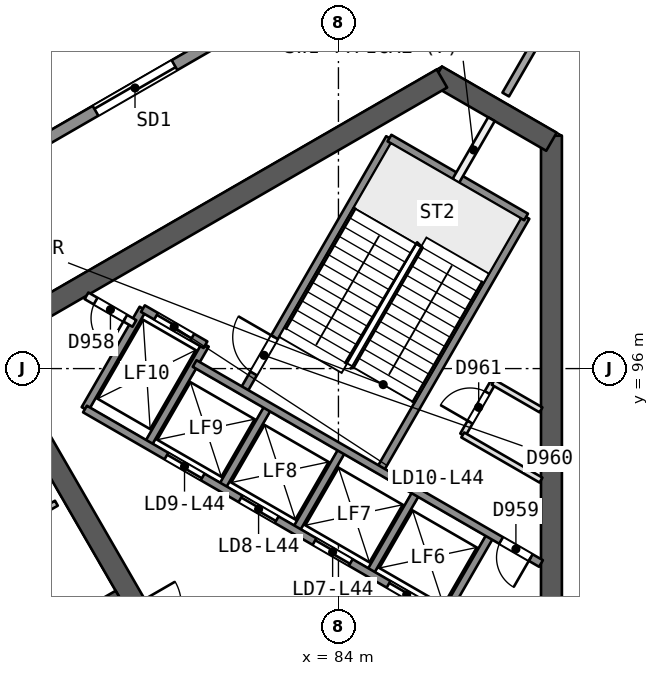
"""IFC4 building model, lengths in metres.
Left out: names, types, materials, properties, quantities, classifications, styles, units other than length and angle.
Written with IfcOpenShell. Run it as: python <this file> out.ifc"""

import sys

from ifc_helpers import new_model, si_unit, direction, frame, frame_2d, origin, place, context, subcontext, project, spatial, rectangle, extrude, element, fill, save


model = new_model("IFC4")
c1 = context("Model", 3, precision=1e-05, world=origin(), true_north=direction((0.0, 1.0)))
c2 = subcontext(c1, "Body", "Model", "MODEL_VIEW")
j1 = project(units=[si_unit("LENGTHUNIT", "METRE"), si_unit("PLANEANGLEUNIT", "RADIAN")], contexts=[c1])
p1 = place(None, origin())
s1 = spatial("IfcSite", under=j1, at=p1, CompositionType="ELEMENT")
p2 = place(p1, origin())
s2 = spatial("IfcBuilding", under=s1, at=p2, CompositionType="ELEMENT")
p3 = place(p2, frame((0.0, 0.0, 182.2)))
s3 = spatial("IfcBuildingStorey", under=s2, at=p3, CompositionType="ELEMENT", Elevation=182.2)
p4 = place(p3, frame((89.605, 88.069, 0.0), z_axis=(0.0, 0.0, 1.0), x_axis=(0.0, 1.0, 0.0)))
e1 = element("IfcWall", 1, at=p4, inside=s3, PredefinedType="SHEAR", context=c2, shape_type="SweptSolid", body=[
    extrude(rectangle(XDim=14.058, YDim=0.55, at=frame_2d((7.029, 0.0))), origin(), (0.0, 0.0, 1.0), 3.7),
])
p5 = place(p3, frame((89.605, 101.969, 0.0), z_axis=(0.0, 0.0, 1.0), x_axis=(-0.865997833373, 0.500047750313, 0.0)))
e2 = element("IfcWall", 2, at=p5, inside=s3, PredefinedType="SHEAR", context=c2, shape_type="SweptSolid", body=[
    extrude(rectangle(XDim=3.487, YDim=0.55, at=frame_2d((1.743, 0.0))), origin(), (0.0, 0.0, 1.0), 3.7),
])
p6 = place(p3, frame((86.723, 103.633, 0.0), z_axis=(0.0, 0.0, 1.0), x_axis=(-0.866023530946, -0.500003243837, 0.0)))
e3 = element("IfcWall", 3, at=p6, inside=s3, PredefinedType="SHEAR", context=c2, shape_type="SweptSolid", body=[
    extrude(rectangle(XDim=14.175, YDim=0.55, at=frame_2d((7.087, 0.0))), origin(), (0.0, 0.0, 1.0), 3.7),
])
p7 = place(p3, frame((74.686, 96.683, 0.0), z_axis=(0.0, 0.0, 1.0), x_axis=(0.499997818338, -0.866026663364, 0.0)))
e4 = element("IfcWall", 4, at=p7, inside=s3, PredefinedType="SHEAR", context=c2, shape_type="SweptSolid", body=[
    extrude(rectangle(XDim=10.105, YDim=0.55, at=frame_2d((5.052, 0.0))), origin(), (0.0, 0.0, 1.0), 3.7),
])
p8 = place(p7, frame((7.955, 0.0, 0.0)))
e5 = element("IfcOpeningElement", 5, at=p8, cuts=e4, PredefinedType="OPENING", context=c2, shape_type="SweptSolid", body=[
    extrude(rectangle(XDim=1.2, YDim=2.1, at=frame_2d((0.6, 1.05))), frame((0.0, 0.286, 0.0), z_axis=(0.0, -1.0, 0.0), x_axis=(1.0, 0.0, 0.0)), (0.0, 0.0, 1.0), 0.571),
])
p9 = place(p3, frame((78.2, 90.046, 0.0), z_axis=(0.0, 0.0, 1.0), x_axis=(-0.866026492143, -0.499998114903, 0.0)))
e6 = element("IfcWall", 6, at=p9, inside=s3, PredefinedType="SHEAR", context=c2, shape_type="SweptSolid", body=[
    extrude(rectangle(XDim=15.588, YDim=0.25, at=frame_2d((7.794, 0.0))), origin(), (0.0, 0.0, 1.0), 3.25),
])
p10 = place(p9, frame((3.138, 0.0, 0.0)))
e7 = element("IfcOpeningElement", 7, at=p10, cuts=e6, PredefinedType="OPENING", context=c2, shape_type="SweptSolid", body=[
    extrude(rectangle(XDim=1.0, YDim=2.1, at=frame_2d((0.5, 1.05))), frame((0.0, 0.135, 0.0), z_axis=(0.0, -1.0, 0.0), x_axis=(1.0, 0.0, 0.0)), (0.0, 0.0, 1.0), 0.271),
])
p11 = place(p9, frame((6.415, 0.0, 0.0)))
e8 = element("IfcOpeningElement", 8, at=p11, cuts=e6, PredefinedType="OPENING", context=c2, shape_type="SweptSolid", body=[
    extrude(rectangle(XDim=1.2, YDim=2.4, at=frame_2d((0.6, 1.2))), frame((0.0, 0.135, 0.0), z_axis=(0.0, -1.0, 0.0), x_axis=(1.0, 0.0, 0.0)), (0.0, 0.0, 1.0), 0.271),
])
p12 = place(p9, frame((11.971, 0.0, 0.0)))
e9 = element("IfcOpeningElement", 9, at=p12, cuts=e6, PredefinedType="OPENING", context=c2, shape_type="SweptSolid", body=[
    extrude(rectangle(XDim=1.0, YDim=2.1, at=frame_2d((0.5, 1.05))), frame((0.0, 0.135, 0.0), z_axis=(0.0, -1.0, 0.0), x_axis=(1.0, 0.0, 0.0)), (0.0, 0.0, 1.0), 0.271),
])
p13 = place(p3, frame((91.006, 107.721, 0.0), z_axis=(0.0, 0.0, 1.0), x_axis=(-0.500015953014, -0.866016193112, 0.0)))
e10 = element("IfcWall", 10, at=p13, inside=s3, PredefinedType="PARTITIONING", context=c2, shape_type="SweptSolid", body=[
    extrude(rectangle(XDim=5.208, YDim=0.2, at=frame_2d((2.604, 0.0))), origin(), (0.0, 0.0, 1.0), 3.25),
])
p14 = place(p3, frame((74.498, 91.257, 0.0), z_axis=(0.0, 0.0, 1.0), x_axis=(0.866038271014, 0.499977712642, 0.0)))
e11 = element("IfcWall", 11, at=p14, inside=s3, PredefinedType="PARTITIONING", context=c2, shape_type="SweptSolid", body=[
    extrude(rectangle(XDim=2.401, YDim=0.15, at=frame_2d((1.2, 0.0))), origin(), (0.0, 0.0, 1.0), 3.25),
])
p15 = place(p3, frame((42.841, 82.711, 0.0), z_axis=(0.0, 0.0, 1.0), x_axis=(0.866024774967, 0.500001089142, 0.0)))
e12 = element("IfcWall", 12, at=p15, inside=s3, PredefinedType="SOLIDWALL", context=c2, shape_type="SweptSolid", body=[
    extrude(rectangle(XDim=52.991, YDim=0.3, at=frame_2d((26.496, 0.0))), origin(), (0.0, 0.0, 1.0), 3.25),
])
p16 = place(p15, frame((20.619, 0.0, 0.0)))
e13 = element("IfcOpeningElement", 13, at=p16, cuts=e12, PredefinedType="OPENING", context=c2, shape_type="SweptSolid", body=[
    extrude(rectangle(XDim=2.4, YDim=2.4, at=frame_2d((1.2, 1.2))), frame((0.0, 0.161, 0.0), z_axis=(0.0, -1.0, 0.0), x_axis=(1.0, 0.0, 0.0)), (0.0, 0.0, 1.0), 0.321),
])
p17 = place(p15, frame((9.392, 0.0, 0.0)))
e14 = element("IfcOpeningElement", 14, at=p17, cuts=e12, PredefinedType="OPENING", context=c2, shape_type="SweptSolid", body=[
    extrude(rectangle(XDim=2.4, YDim=2.4, at=frame_2d((1.2, 1.2))), frame((0.0, 0.161, 0.0), z_axis=(0.0, -1.0, 0.0), x_axis=(1.0, 0.0, 0.0)), (0.0, 0.0, 1.0), 0.321),
])
p18 = place(p15, frame((40.145, 0.0, 0.0)))
e15 = element("IfcOpeningElement", 15, at=p18, cuts=e12, PredefinedType="OPENING", context=c2, shape_type="SweptSolid", body=[
    extrude(rectangle(XDim=2.4, YDim=2.4, at=frame_2d((1.2, 1.2))), frame((0.0, 0.161, 0.0), z_axis=(0.0, -1.0, 0.0), x_axis=(1.0, 0.0, 0.0)), (0.0, 0.0, 1.0), 0.321),
])
p19 = place(p15, frame((26.375, 0.0, 0.9)))
e16 = element("IfcOpeningElement", 16, at=p19, cuts=e12, PredefinedType="OPENING", context=c2, shape_type="SweptSolid", body=[
    extrude(rectangle(XDim=1.8, YDim=1.5, at=frame_2d((0.9, 0.75))), frame((0.0, 0.161, 0.0), z_axis=(0.0, -1.0, 0.0), x_axis=(1.0, 0.0, 0.0)), (0.0, 0.0, 1.0), 0.321),
])
p20 = place(p3, frame((86.77, 89.486, 0.0), z_axis=(0.0, 0.0, 1.0), x_axis=(0.499961042966, 0.86604789447, 0.0)))
e17 = element("IfcWall", 17, at=p20, inside=s3, PredefinedType="SOLIDWALL", context=c2, shape_type="SweptSolid", body=[
    extrude(rectangle(XDim=2.48, YDim=0.2, at=frame_2d((1.24, 0.0))), origin(), (0.0, 0.0, 1.0), 3.25),
])
p21 = place(p3, frame((87.271, 94.254, 0.0), z_axis=(0.0, 0.0, 1.0), x_axis=(0.499995408039, 0.866028054938, 0.0)))
e18 = element("IfcWall", 18, at=p21, inside=s3, PredefinedType="PARTITIONING", context=c2, shape_type="SweptSolid", body=[
    extrude(rectangle(XDim=1.6, YDim=0.15, at=frame_2d((0.8, 0.0))), origin(), (0.0, 0.0, 1.0), 3.25),
])
p22 = place(p21, frame((0.387, 0.0, 0.0)))
e19 = element("IfcOpeningElement", 19, at=p22, cuts=e18, PredefinedType="OPENING", context=c2, shape_type="SweptSolid", body=[
    extrude(rectangle(XDim=0.9, YDim=2.1, at=frame_2d((0.45, 1.05))), frame((0.0, 0.085, 0.0), z_axis=(0.0, -1.0, 0.0), x_axis=(1.0, 0.0, 0.0)), (0.0, 0.0, 1.0), 0.171),
])
p23 = place(p3, frame((84.821, 90.611, 0.0), z_axis=(0.0, 0.0, 1.0), x_axis=(0.499961042966, 0.86604789447, 0.0)))
e20 = element("IfcWall", 20, at=p23, inside=s3, PredefinedType="SOLIDWALL", context=c2, shape_type="SweptSolid", body=[
    extrude(rectangle(XDim=2.48, YDim=0.2, at=frame_2d((1.24, 0.0))), origin(), (0.0, 0.0, 1.0), 3.25),
])
p24 = place(p3, frame((85.087, 93.321, 0.0), z_axis=(0.0, 0.0, 1.0), x_axis=(0.500019787375, 0.866013979237, 0.0)))
e21 = element("IfcWall", 21, at=p24, inside=s3, PredefinedType="SOLIDWALL", context=c2, shape_type="SweptSolid", body=[
    extrude(rectangle(XDim=7.7, YDim=0.2, at=frame_2d((3.85, 0.0))), origin(), (0.0, 0.0, 1.0), 3.25),
])
p25 = place(p3, frame((82.873, 91.736, 0.0), z_axis=(0.0, 0.0, 1.0), x_axis=(0.499961042966, 0.86604789447, 0.0)))
e22 = element("IfcWall", 22, at=p25, inside=s3, PredefinedType="SOLIDWALL", context=c2, shape_type="SweptSolid", body=[
    extrude(rectangle(XDim=2.48, YDim=0.2, at=frame_2d((1.24, 0.0))), origin(), (0.0, 0.0, 1.0), 3.25),
])
p26 = place(p3, frame((87.09, 100.94, 0.0), z_axis=(0.0, 0.0, 1.0), x_axis=(0.499951854219, 0.86605319898, 0.0)))
e23 = element("IfcWall", 23, at=p26, inside=s3, PredefinedType="PARTITIONING", context=c2, shape_type="SweptSolid", body=[
    extrude(rectangle(XDim=1.873, YDim=0.2, at=frame_2d((0.937, 0.0))), origin(), (0.0, 0.0, 1.0), 3.25),
])
p27 = place(p3, frame((80.924, 92.861, 0.0), z_axis=(0.0, 0.0, 1.0), x_axis=(0.499961042966, 0.86604789447, 0.0)))
e24 = element("IfcWall", 24, at=p27, inside=s3, PredefinedType="SOLIDWALL", context=c2, shape_type="SweptSolid", body=[
    extrude(rectangle(XDim=2.48, YDim=0.2, at=frame_2d((1.24, 0.0))), origin(), (0.0, 0.0, 1.0), 3.25),
])
p28 = place(p3, frame((81.493, 95.396, 0.0), z_axis=(0.0, 0.0, 1.0), x_axis=(0.500006057782, 0.866021906294, 0.0)))
e25 = element("IfcWall", 25, at=p28, inside=s3, PredefinedType="SOLIDWALL", context=c2, shape_type="SweptSolid", body=[
    extrude(rectangle(XDim=7.7, YDim=0.2, at=frame_2d((3.85, 0.0))), origin(), (0.0, 0.0, 1.0), 3.25),
])
p29 = place(p28, frame((0.55, 0.0, 0.0)))
e26 = element("IfcOpeningElement", 26, at=p29, cuts=e25, PredefinedType="OPENING", context=c2, shape_type="SweptSolid", body=[
    extrude(rectangle(XDim=1.1, YDim=2.1, at=frame_2d((0.55, 1.05))), frame((0.0, 0.11, 0.0), z_axis=(0.0, -1.0, 0.0), x_axis=(1.0, 0.0, 0.0)), (0.0, 0.0, 1.0), 0.221),
])
for number, where, z_axis, x_axis in (
    (27, (78.976, 93.986, 0.0), (0.0, 0.0, 1.0), (0.5, 0.866, 0.0)),
    (28, (77.33, 94.936, 0.0), (0.0, 0.0, 1.0), (0.5, 0.866, 0.0)),
):
    element("IfcWall", number, at=place(p3, frame(where, z_axis=z_axis, x_axis=x_axis)), inside=s3, PredefinedType="SOLIDWALL", context=c2, shape_type="SweptSolid", body=[
        extrude(rectangle(XDim=3.05, YDim=0.2, at=frame_2d((1.525, 0.0))), origin(), (0.0, 0.0, 1.0), 3.25),
    ])
p30 = place(p3, frame((86.77, 89.486, 0.0), z_axis=(0.0, 0.0, 1.0), x_axis=(-0.86601811187, 0.500012629753, 0.0)))
e29 = element("IfcWall", 29, at=p30, inside=s3, PredefinedType="SOLIDWALL", context=c2, shape_type="SweptSolid", body=[
    extrude(rectangle(XDim=10.9, YDim=0.2, at=frame_2d((5.45, 0.0))), origin(), (0.0, 0.0, 1.0), 3.25),
])
p31 = place(p30, frame((0.575, 0.0, 0.0)))
e30 = element("IfcOpeningElement", 30, at=p31, cuts=e29, PredefinedType="OPENING", context=c2, shape_type="SweptSolid", body=[
    extrude(rectangle(XDim=1.1, YDim=2.1, at=frame_2d((0.55, 1.05))), frame((0.0, 0.11, 0.0), z_axis=(0.0, -1.0, 0.0), x_axis=(1.0, 0.0, 0.0)), (0.0, 0.0, 1.0), 0.221),
])
p32 = place(p30, frame((2.825, 0.0, 0.0)))
e31 = element("IfcOpeningElement", 31, at=p32, cuts=e29, PredefinedType="OPENING", context=c2, shape_type="SweptSolid", body=[
    extrude(rectangle(XDim=1.1, YDim=2.1, at=frame_2d((0.55, 1.05))), frame((0.0, 0.11, 0.0), z_axis=(0.0, -1.0, 0.0), x_axis=(1.0, 0.0, 0.0)), (0.0, 0.0, 1.0), 0.221),
])
p33 = place(p30, frame((5.075, 0.0, 0.0)))
e32 = element("IfcOpeningElement", 32, at=p33, cuts=e29, PredefinedType="OPENING", context=c2, shape_type="SweptSolid", body=[
    extrude(rectangle(XDim=1.1, YDim=2.1, at=frame_2d((0.55, 1.05))), frame((0.0, 0.11, 0.0), z_axis=(0.0, -1.0, 0.0), x_axis=(1.0, 0.0, 0.0)), (0.0, 0.0, 1.0), 0.221),
])
p34 = place(p30, frame((7.325, 0.0, 0.0)))
e33 = element("IfcOpeningElement", 33, at=p34, cuts=e29, PredefinedType="OPENING", context=c2, shape_type="SweptSolid", body=[
    extrude(rectangle(XDim=1.1, YDim=2.1, at=frame_2d((0.55, 1.05))), frame((0.0, 0.11, 0.0), z_axis=(0.0, -1.0, 0.0), x_axis=(1.0, 0.0, 0.0)), (0.0, 0.0, 1.0), 0.221),
])
p35 = place(p3, frame((89.33, 90.872, 0.0), z_axis=(0.0, 0.0, 1.0), x_axis=(-0.866027589512, 0.49999621419, 0.0)))
e34 = element("IfcWall", 34, at=p35, inside=s3, PredefinedType="SOLIDWALL", context=c2, shape_type="SweptSolid", body=[
    extrude(rectangle(XDim=10.524, YDim=0.2, at=frame_2d((5.262, 0.0))), origin(), (0.0, 0.0, 1.0), 3.25),
])
p36 = place(p35, frame((0.312, 0.0, 0.0)))
e35 = element("IfcOpeningElement", 35, at=p36, cuts=e34, PredefinedType="OPENING", context=c2, shape_type="SweptSolid", body=[
    extrude(rectangle(XDim=0.9, YDim=2.1, at=frame_2d((0.45, 1.05))), frame((0.0, 0.11, 0.0), z_axis=(0.0, -1.0, 0.0), x_axis=(1.0, 0.0, 0.0)), (0.0, 0.0, 1.0), 0.221),
])
p37 = place(p3, frame((78.63, 97.188, 0.0), z_axis=(0.0, 0.0, 1.0), x_axis=(-0.866003949776, 0.500037157592, 0.0)))
e36 = element("IfcWall", 36, at=p37, inside=s3, PredefinedType="PARTITIONING", context=c2, shape_type="SweptSolid", body=[
    extrude(rectangle(XDim=1.455, YDim=0.2, at=frame_2d((0.728, 0.0))), origin(), (0.0, 0.0, 1.0), 3.25),
])
p38 = place(p37, frame((0.278, 0.0, 0.0)))
e37 = element("IfcOpeningElement", 37, at=p38, cuts=e36, PredefinedType="OPENING", context=c2, shape_type="SweptSolid", body=[
    extrude(rectangle(XDim=0.9, YDim=2.1, at=frame_2d((0.45, 1.05))), frame((0.0, 0.11, 0.0), z_axis=(0.0, -1.0, 0.0), x_axis=(1.0, 0.0, 0.0)), (0.0, 0.0, 1.0), 0.221),
])
p39 = place(p3, frame((80.5, 96.627, 0.0), z_axis=(0.0, 0.0, 1.0), x_axis=(-0.86601224135, 0.500022797313, 0.0)))
e38 = element("IfcWall", 38, at=p39, inside=s3, PredefinedType="SOLIDWALL", context=c2, shape_type="SweptSolid", body=[
    extrude(rectangle(XDim=1.9, YDim=0.2, at=frame_2d((0.95, 0.0))), origin(), (0.0, 0.0, 1.0), 3.25),
])
p40 = place(p39, frame((0.4, 0.0, 0.0)))
e39 = element("IfcOpeningElement", 39, at=p40, cuts=e38, PredefinedType="OPENING", context=c2, shape_type="SweptSolid", body=[
    extrude(rectangle(XDim=1.1, YDim=2.1, at=frame_2d((0.55, 1.05))), frame((0.0, 0.11, 0.0), z_axis=(0.0, -1.0, 0.0), x_axis=(1.0, 0.0, 0.0)), (0.0, 0.0, 1.0), 0.221),
])
p41 = place(p3, frame((89.33, 93.065, 0.0), z_axis=(0.0, 0.0, 1.0), x_axis=(-0.866041951395, 0.499971337603, 0.0)))
e40 = element("IfcWall", 40, at=p41, inside=s3, PredefinedType="PARTITIONING", context=c2, shape_type="SweptSolid", body=[
    extrude(rectangle(XDim=2.378, YDim=0.15, at=frame_2d((1.189, 0.0))), origin(), (0.0, 0.0, 1.0), 3.25),
])
p42 = place(p3, frame((89.33, 94.913, 0.0), z_axis=(0.0, 0.0, 1.0), x_axis=(-0.865981433661, 0.500076150755, 0.0)))
e41 = element("IfcWall", 41, at=p42, inside=s3, PredefinedType="PARTITIONING", context=c2, shape_type="SweptSolid", body=[
    extrude(rectangle(XDim=1.454, YDim=0.15, at=frame_2d((0.727, 0.0))), origin(), (0.0, 0.0, 1.0), 3.25),
])
p43 = place(p3, frame((88.937, 99.99, 0.0), z_axis=(0.0, 0.0, 1.0), x_axis=(-0.866004344652, 0.500036473714, 0.0)))
e42 = element("IfcWall", 42, at=p43, inside=s3, PredefinedType="SOLIDWALL", context=c2, shape_type="SweptSolid", body=[
    extrude(rectangle(XDim=4.15, YDim=0.2, at=frame_2d((2.075, 0.0))), origin(), (0.0, 0.0, 1.0), 3.25),
])
p44 = place(p18, origin())
e43 = element("IfcDoor", 43, at=p44, inside=s3, OperationType="SLIDING_TO_LEFT", PredefinedType="NOTDEFINED", context=c2, shape_type="SweptSolid", body=[
    extrude(rectangle(XDim=2.4, YDim=2.4, at=frame_2d((1.2, 1.2))), frame((0.0, 0.025, 0.0), z_axis=(0.0, -1.0, 0.0), x_axis=(1.0, 0.0, 0.0)), (0.0, 0.0, 1.0), 0.05),
])
fill(e15, e43)
p45 = place(p31, origin())
e44 = element("IfcDoor", 44, at=p45, inside=s3, OperationType="SLIDING_TO_RIGHT", PredefinedType="NOTDEFINED", context=c2, shape_type="SweptSolid", body=[
    extrude(rectangle(XDim=1.1, YDim=2.1, at=frame_2d((0.55, 1.05))), frame((0.0, 0.025, 0.0), z_axis=(0.0, -1.0, 0.0), x_axis=(1.0, 0.0, 0.0)), (0.0, 0.0, 1.0), 0.05),
])
fill(e30, e44)
p46 = place(p32, origin())
e45 = element("IfcDoor", 45, at=p46, inside=s3, OperationType="SLIDING_TO_LEFT", PredefinedType="NOTDEFINED", context=c2, shape_type="SweptSolid", body=[
    extrude(rectangle(XDim=1.1, YDim=2.1, at=frame_2d((0.55, 1.05))), frame((0.0, 0.025, 0.0), z_axis=(0.0, -1.0, 0.0), x_axis=(1.0, 0.0, 0.0)), (0.0, 0.0, 1.0), 0.05),
])
fill(e31, e45)
p47 = place(p33, origin())
e46 = element("IfcDoor", 46, at=p47, inside=s3, OperationType="SLIDING_TO_RIGHT", PredefinedType="NOTDEFINED", context=c2, shape_type="SweptSolid", body=[
    extrude(rectangle(XDim=1.1, YDim=2.1, at=frame_2d((0.55, 1.05))), frame((0.0, 0.025, 0.0), z_axis=(0.0, -1.0, 0.0), x_axis=(1.0, 0.0, 0.0)), (0.0, 0.0, 1.0), 0.05),
])
fill(e32, e46)
p48 = place(p34, origin())
e47 = element("IfcDoor", 47, at=p48, inside=s3, OperationType="SLIDING_TO_LEFT", PredefinedType="NOTDEFINED", context=c2, shape_type="SweptSolid", body=[
    extrude(rectangle(XDim=1.1, YDim=2.1, at=frame_2d((0.55, 1.05))), frame((0.0, 0.025, 0.0), z_axis=(0.0, -1.0, 0.0), x_axis=(1.0, 0.0, 0.0)), (0.0, 0.0, 1.0), 0.05),
])
fill(e33, e47)
p49 = place(p40, origin())
e48 = element("IfcDoor", 48, at=p49, inside=s3, OperationType="SLIDING_TO_RIGHT", PredefinedType="NOTDEFINED", context=c2, shape_type="SweptSolid", body=[
    extrude(rectangle(XDim=1.1, YDim=2.1, at=frame_2d((0.55, 1.05))), frame((0.0, 0.025, 0.0), z_axis=(0.0, -1.0, 0.0), x_axis=(1.0, 0.0, 0.0)), (0.0, 0.0, 1.0), 0.05),
])
fill(e39, e48)
p50 = place(p38, origin())
e49 = element("IfcDoor", 49, at=p50, inside=s3, OperationType="SINGLE_SWING_LEFT", PredefinedType="NOTDEFINED", context=c2, shape_type="SweptSolid", body=[
    extrude(rectangle(XDim=0.9, YDim=2.1, at=frame_2d((0.45, 1.05))), frame((0.0, 0.025, 0.0), z_axis=(0.0, -1.0, 0.0), x_axis=(1.0, 0.0, 0.0)), (0.0, 0.0, 1.0), 0.05),
])
fill(e37, e49)
p51 = place(p36, origin())
e50 = element("IfcDoor", 50, at=p51, inside=s3, OperationType="SINGLE_SWING_LEFT", PredefinedType="NOTDEFINED", context=c2, shape_type="SweptSolid", body=[
    extrude(rectangle(XDim=0.9, YDim=2.1, at=frame_2d((0.45, 1.05))), frame((0.0, 0.025, 0.0), z_axis=(0.0, -1.0, 0.0), x_axis=(1.0, 0.0, 0.0)), (0.0, 0.0, 1.0), 0.05),
])
fill(e35, e50)
p52 = place(p29, origin())
e51 = element("IfcDoor", 51, at=p52, inside=s3, OperationType="SINGLE_SWING_RIGHT", PredefinedType="NOTDEFINED", context=c2, shape_type="SweptSolid", body=[
    extrude(rectangle(XDim=1.1, YDim=2.1, at=frame_2d((0.55, 1.05))), frame((0.0, 0.025, 0.0), z_axis=(0.0, -1.0, 0.0), x_axis=(1.0, 0.0, 0.0)), (0.0, 0.0, 1.0), 0.05),
])
fill(e26, e51)
p53 = place(p22, origin())
e52 = element("IfcDoor", 52, at=p53, inside=s3, OperationType="SINGLE_SWING_LEFT", PredefinedType="NOTDEFINED", context=c2, shape_type="SweptSolid", body=[
    extrude(rectangle(XDim=0.9, YDim=2.1, at=frame_2d((0.45, 1.05))), frame((0.0, 0.025, 0.0), z_axis=(0.0, -1.0, 0.0), x_axis=(1.0, 0.0, 0.0)), (0.0, 0.0, 1.0), 0.05),
])
fill(e19, e52)
save(model, sys.argv[1])
